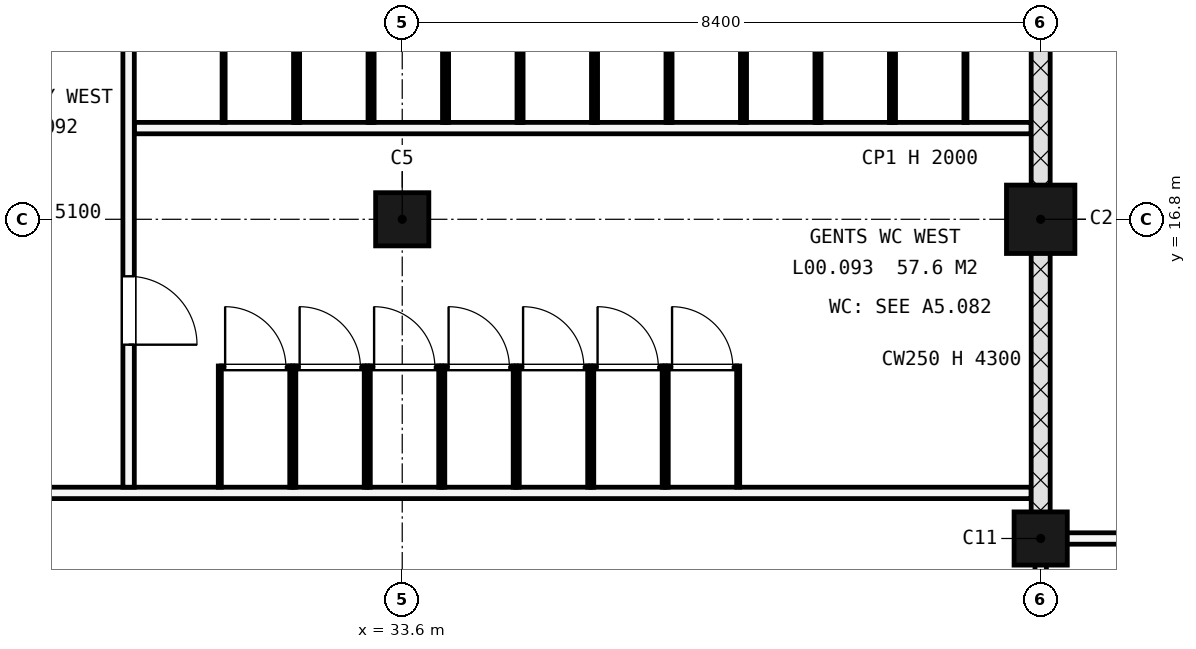
"""IFC4 building model, lengths in metres.
Left out: names, types, materials, properties, quantities, classifications, styles, units other than length and angle.
Written with IfcOpenShell. Run it as: python <this file> out.ifc"""

import sys

from ifc_helpers import new_model, si_unit, direction, frame, frame_2d, origin, origin_2d, place, context, subcontext, project, spatial, rectangle, circle, extrude, element, fill, save


model = new_model("IFC4")
c1 = context("Model", 3, precision=1e-05, world=origin(), true_north=direction((0.0, 1.0)))
c2 = subcontext(c1, "Body", "Model", "MODEL_VIEW")
j1 = project(units=[si_unit("LENGTHUNIT", "METRE"), si_unit("PLANEANGLEUNIT", "RADIAN")], contexts=[c1])
p1 = place(None, origin())
s1 = spatial("IfcSite", under=j1, at=p1, CompositionType="ELEMENT")
p2 = place(p1, origin())
s2 = spatial("IfcBuilding", under=s1, at=p2, CompositionType="ELEMENT")
p3 = place(p2, origin())
s3 = spatial("IfcBuildingStorey", under=s2, at=p3, CompositionType="ELEMENT", Elevation=0.0)
p4 = place(p3, frame((33.6, 16.8, -0.3), z_axis=(0.0, 0.0, 1.0), x_axis=(1.0, 0.0, 0.0)))
e1 = element("IfcColumn", 1, at=p4, inside=s3, PredefinedType="COLUMN", context=c2, shape_type="SweptSolid", body=[
    extrude(rectangle(XDim=0.7, YDim=0.7, at=origin_2d()), origin(), (0.0, 0.0, 1.0), 5.4),
])
p5 = place(p3, frame((42.0, 16.8, -0.3), z_axis=(0.0, 0.0, 1.0), x_axis=(1.0, 0.0, 0.0)))
e2 = element("IfcColumn", 2, at=p5, inside=s3, PredefinedType="COLUMN", context=c2, shape_type="SweptSolid", body=[
    extrude(rectangle(XDim=0.9, YDim=0.9, at=origin_2d()), origin(), (0.0, 0.0, 1.0), 5.4),
])
p6 = place(p3, frame((42.0, 12.6, -0.3), z_axis=(0.0, 0.0, 1.0), x_axis=(1.0, 0.0, 0.0)))
e3 = element("IfcColumn", 3, at=p6, inside=s3, PredefinedType="COLUMN", context=c2, shape_type="SweptSolid", body=[
    extrude(circle(Radius=0.35, at=origin_2d()), origin(), (0.0, 0.0, 1.0), 5.4),
])
p7 = place(p3, frame((41.875, 12.6, 0.0), z_axis=(0.0, 0.0, 1.0), x_axis=(1.0, 0.0, 0.0)))
e4 = element("IfcWall", 4, at=p7, inside=s3, PredefinedType="PARTITIONING", context=c2, shape_type="SweptSolid", body=[
    extrude(rectangle(XDim=42.025, YDim=0.15, at=frame_2d((21.012, 0.0))), origin(), (0.0, 0.0, 1.0), 4.2),
])
p8 = place(p7, frame((19.925, 0.0, 0.0)))
e5 = element("IfcOpeningElement", 5, at=p8, cuts=e4, PredefinedType="OPENING", context=c2, shape_type="SweptSolid", body=[
    extrude(rectangle(XDim=2.4, YDim=2.1, at=frame_2d((1.2, 1.05))), frame((0.0, 0.085, 0.0), z_axis=(0.0, -1.0, 0.0), x_axis=(1.0, 0.0, 0.0)), (0.0, 0.0, 1.0), 0.17),
])
p9 = place(p3, frame((27.675, 13.2, 0.0), z_axis=(0.0, 0.0, 1.0), x_axis=(1.0, 0.0, 0.0)))
e6 = element("IfcWall", 6, at=p9, inside=s3, PredefinedType="PARTITIONING", context=c2, shape_type="SweptSolid", body=[
    extrude(rectangle(XDim=14.2, YDim=0.15, at=frame_2d((7.1, 0.0))), origin(), (0.0, 0.0, 1.0), 5.1),
])
p10 = place(p3, frame((30.075, 18.0, 0.0), z_axis=(0.0, 0.0, 1.0), x_axis=(1.0, 0.0, 0.0)))
e7 = element("IfcWall", 7, at=p10, inside=s3, PredefinedType="PARTITIONING", context=c2, shape_type="SweptSolid", body=[
    extrude(rectangle(XDim=11.8, YDim=0.15, at=frame_2d((5.9, 0.0))), origin(), (0.0, 0.0, 1.0), 5.1),
])
p11 = place(p3, frame((30.0, 13.275, 0.0), z_axis=(0.0, 0.0, 1.0), x_axis=(0.0, 1.0, 0.0)))
e8 = element("IfcWall", 8, at=p11, inside=s3, PredefinedType="PARTITIONING", context=c2, shape_type="SweptSolid", body=[
    extrude(rectangle(XDim=11.825, YDim=0.15, at=frame_2d((5.913, 0.0))), origin(), (0.0, 0.0, 1.0), 5.1),
])
p12 = place(p11, frame((1.875, 0.0, 0.0)))
e9 = element("IfcOpeningElement", 9, at=p12, cuts=e8, PredefinedType="OPENING", context=c2, shape_type="SweptSolid", body=[
    extrude(rectangle(XDim=0.9, YDim=2.1, at=frame_2d((0.45, 1.05))), frame((0.0, 0.085, 0.0), z_axis=(0.0, -1.0, 0.0), x_axis=(1.0, 0.0, 0.0)), (0.0, 0.0, 1.0), 0.17),
])
p13 = place(p11, frame((6.575, 0.0, 0.0)))
e10 = element("IfcOpeningElement", 10, at=p13, cuts=e8, PredefinedType="OPENING", context=c2, shape_type="SweptSolid", body=[
    extrude(rectangle(XDim=0.9, YDim=2.1, at=frame_2d((0.45, 1.05))), frame((0.0, 0.085, 0.0), z_axis=(0.0, -1.0, 0.0), x_axis=(1.0, 0.0, 0.0)), (0.0, 0.0, 1.0), 0.17),
])
p14 = place(p11, frame((10.1, 0.0, 0.0)))
e11 = element("IfcOpeningElement", 11, at=p14, cuts=e8, PredefinedType="OPENING", context=c2, shape_type="SweptSolid", body=[
    extrude(rectangle(XDim=1.05, YDim=2.25, at=frame_2d((0.525, 1.125))), frame((0.0, 0.085, 0.0), z_axis=(0.0, -1.0, 0.0), x_axis=(1.0, 0.0, 0.0)), (0.0, 0.0, 1.0), 0.17),
])
p15 = place(p3, frame((42.0, 8.65, 0.0), z_axis=(0.0, 0.0, 1.0), x_axis=(0.0, 1.0, 0.0)))
e12 = element("IfcWall", 12, at=p15, inside=s3, PredefinedType="PARTITIONING", context=c2, shape_type="SweptSolid", body=[
    extrude(rectangle(XDim=3.875, YDim=0.15, at=frame_2d((1.938, 0.0))), origin(), (0.0, 0.0, 1.0), 4.3),
])
p16 = place(p3, frame((42.0, 12.675, 0.0), z_axis=(0.0, 0.0, 1.0), x_axis=(0.0, 1.0, 0.0)))
e13 = element("IfcWall", 13, at=p16, inside=s3, PredefinedType="SOLIDWALL", context=c2, shape_type="SweptSolid", body=[
    extrude(rectangle(XDim=4.555, YDim=0.25, at=frame_2d((2.277, 0.0))), origin(), (0.0, 0.0, 1.0), 4.3),
])
p17 = place(p3, frame((42.0, 17.23, 0.0), z_axis=(0.0, 0.0, 1.0), x_axis=(0.0, 1.0, 0.0)))
e14 = element("IfcWall", 14, at=p17, inside=s3, PredefinedType="SOLIDWALL", context=c2, shape_type="SweptSolid", body=[
    extrude(rectangle(XDim=7.87, YDim=0.25, at=frame_2d((3.935, 0.0))), origin(), (0.0, 0.0, 1.0), 4.45),
])
p18 = place(p17, frame((6.17, 0.0, 0.0)))
e15 = element("IfcOpeningElement", 15, at=p18, cuts=e14, PredefinedType="OPENING", context=c2, shape_type="SweptSolid", body=[
    extrude(rectangle(XDim=1.0, YDim=2.1, at=frame_2d((0.5, 1.05))), frame((0.0, 0.135, 0.0), z_axis=(0.0, -1.0, 0.0), x_axis=(1.0, 0.0, 0.0)), (0.0, 0.0, 1.0), 0.27),
])
for number, where, z_axis, x_axis in (
    (16, (31.2, 13.275, 0.0), (0.0, 0.0, 1.0), (0.0, 1.0, 0.0)),
    (17, (32.14, 13.275, 0.0), (0.0, 0.0, 1.0), (0.0, 1.0, 0.0)),
):
    element("IfcWall", number, at=place(p3, frame(where, z_axis=z_axis, x_axis=x_axis)), inside=s3, PredefinedType="PARTITIONING", context=c2, shape_type="SweptSolid", body=[
        extrude(rectangle(XDim=1.595, YDim=0.04, at=frame_2d((0.798, 0.0))), origin(), (0.0, 0.0, 1.0), 2.0),
    ])
p19 = place(p3, frame((31.22, 14.85, 0.0), z_axis=(0.0, 0.0, 1.0), x_axis=(1.0, 0.0, 0.0)))
e18 = element("IfcWall", 18, at=p19, inside=s3, PredefinedType="PARTITIONING", context=c2, shape_type="SweptSolid", body=[
    extrude(rectangle(XDim=0.9, YDim=0.04, at=frame_2d((0.45, 0.0))), origin(), (0.0, 0.0, 1.0), 2.0),
])
p20 = place(p19, frame((0.05, 0.0, 0.0)))
e19 = element("IfcOpeningElement", 19, at=p20, cuts=e18, PredefinedType="OPENING", context=c2, shape_type="SweptSolid", body=[
    extrude(rectangle(XDim=0.8, YDim=2.0, at=frame_2d((0.4, 1.0))), frame((0.0, 0.03, 0.0), z_axis=(0.0, -1.0, 0.0), x_axis=(1.0, 0.0, 0.0)), (0.0, 0.0, 1.0), 0.06),
])
for number, where, z_axis, x_axis in (
    (20, (32.18, 13.275, 0.0), (0.0, 0.0, 1.0), (0.0, 1.0, 0.0)),
    (21, (33.12, 13.275, 0.0), (0.0, 0.0, 1.0), (0.0, 1.0, 0.0)),
):
    element("IfcWall", number, at=place(p3, frame(where, z_axis=z_axis, x_axis=x_axis)), inside=s3, PredefinedType="PARTITIONING", context=c2, shape_type="SweptSolid", body=[
        extrude(rectangle(XDim=1.595, YDim=0.04, at=frame_2d((0.798, 0.0))), origin(), (0.0, 0.0, 1.0), 2.0),
    ])
p21 = place(p3, frame((32.2, 14.85, 0.0), z_axis=(0.0, 0.0, 1.0), x_axis=(1.0, 0.0, 0.0)))
e22 = element("IfcWall", 22, at=p21, inside=s3, PredefinedType="PARTITIONING", context=c2, shape_type="SweptSolid", body=[
    extrude(rectangle(XDim=0.9, YDim=0.04, at=frame_2d((0.45, 0.0))), origin(), (0.0, 0.0, 1.0), 2.0),
])
p22 = place(p21, frame((0.05, 0.0, 0.0)))
e23 = element("IfcOpeningElement", 23, at=p22, cuts=e22, PredefinedType="OPENING", context=c2, shape_type="SweptSolid", body=[
    extrude(rectangle(XDim=0.8, YDim=2.0, at=frame_2d((0.4, 1.0))), frame((0.0, 0.03, 0.0), z_axis=(0.0, -1.0, 0.0), x_axis=(1.0, 0.0, 0.0)), (0.0, 0.0, 1.0), 0.06),
])
for number, where, z_axis, x_axis in (
    (24, (33.16, 13.275, 0.0), (0.0, 0.0, 1.0), (0.0, 1.0, 0.0)),
    (25, (34.1, 13.275, 0.0), (0.0, 0.0, 1.0), (0.0, 1.0, 0.0)),
):
    element("IfcWall", number, at=place(p3, frame(where, z_axis=z_axis, x_axis=x_axis)), inside=s3, PredefinedType="PARTITIONING", context=c2, shape_type="SweptSolid", body=[
        extrude(rectangle(XDim=1.595, YDim=0.04, at=frame_2d((0.798, 0.0))), origin(), (0.0, 0.0, 1.0), 2.0),
    ])
p23 = place(p3, frame((33.18, 14.85, 0.0), z_axis=(0.0, 0.0, 1.0), x_axis=(1.0, 0.0, 0.0)))
e26 = element("IfcWall", 26, at=p23, inside=s3, PredefinedType="PARTITIONING", context=c2, shape_type="SweptSolid", body=[
    extrude(rectangle(XDim=0.9, YDim=0.04, at=frame_2d((0.45, 0.0))), origin(), (0.0, 0.0, 1.0), 2.0),
])
p24 = place(p23, frame((0.05, 0.0, 0.0)))
e27 = element("IfcOpeningElement", 27, at=p24, cuts=e26, PredefinedType="OPENING", context=c2, shape_type="SweptSolid", body=[
    extrude(rectangle(XDim=0.8, YDim=2.0, at=frame_2d((0.4, 1.0))), frame((0.0, 0.03, 0.0), z_axis=(0.0, -1.0, 0.0), x_axis=(1.0, 0.0, 0.0)), (0.0, 0.0, 1.0), 0.06),
])
for number, where, z_axis, x_axis in (
    (28, (34.14, 13.275, 0.0), (0.0, 0.0, 1.0), (0.0, 1.0, 0.0)),
    (29, (35.08, 13.275, 0.0), (0.0, 0.0, 1.0), (0.0, 1.0, 0.0)),
):
    element("IfcWall", number, at=place(p3, frame(where, z_axis=z_axis, x_axis=x_axis)), inside=s3, PredefinedType="PARTITIONING", context=c2, shape_type="SweptSolid", body=[
        extrude(rectangle(XDim=1.595, YDim=0.04, at=frame_2d((0.798, 0.0))), origin(), (0.0, 0.0, 1.0), 2.0),
    ])
p25 = place(p3, frame((34.16, 14.85, 0.0), z_axis=(0.0, 0.0, 1.0), x_axis=(1.0, 0.0, 0.0)))
e30 = element("IfcWall", 30, at=p25, inside=s3, PredefinedType="PARTITIONING", context=c2, shape_type="SweptSolid", body=[
    extrude(rectangle(XDim=0.9, YDim=0.04, at=frame_2d((0.45, 0.0))), origin(), (0.0, 0.0, 1.0), 2.0),
])
p26 = place(p25, frame((0.05, 0.0, 0.0)))
e31 = element("IfcOpeningElement", 31, at=p26, cuts=e30, PredefinedType="OPENING", context=c2, shape_type="SweptSolid", body=[
    extrude(rectangle(XDim=0.8, YDim=2.0, at=frame_2d((0.4, 1.0))), frame((0.0, 0.03, 0.0), z_axis=(0.0, -1.0, 0.0), x_axis=(1.0, 0.0, 0.0)), (0.0, 0.0, 1.0), 0.06),
])
for number, where, z_axis, x_axis in (
    (32, (35.12, 13.275, 0.0), (0.0, 0.0, 1.0), (0.0, 1.0, 0.0)),
    (33, (36.06, 13.275, 0.0), (0.0, 0.0, 1.0), (0.0, 1.0, 0.0)),
):
    element("IfcWall", number, at=place(p3, frame(where, z_axis=z_axis, x_axis=x_axis)), inside=s3, PredefinedType="PARTITIONING", context=c2, shape_type="SweptSolid", body=[
        extrude(rectangle(XDim=1.595, YDim=0.04, at=frame_2d((0.798, 0.0))), origin(), (0.0, 0.0, 1.0), 2.0),
    ])
p27 = place(p3, frame((35.14, 14.85, 0.0), z_axis=(0.0, 0.0, 1.0), x_axis=(1.0, 0.0, 0.0)))
e34 = element("IfcWall", 34, at=p27, inside=s3, PredefinedType="PARTITIONING", context=c2, shape_type="SweptSolid", body=[
    extrude(rectangle(XDim=0.9, YDim=0.04, at=frame_2d((0.45, 0.0))), origin(), (0.0, 0.0, 1.0), 2.0),
])
p28 = place(p27, frame((0.05, 0.0, 0.0)))
e35 = element("IfcOpeningElement", 35, at=p28, cuts=e34, PredefinedType="OPENING", context=c2, shape_type="SweptSolid", body=[
    extrude(rectangle(XDim=0.8, YDim=2.0, at=frame_2d((0.4, 1.0))), frame((0.0, 0.03, 0.0), z_axis=(0.0, -1.0, 0.0), x_axis=(1.0, 0.0, 0.0)), (0.0, 0.0, 1.0), 0.06),
])
for number, where, z_axis, x_axis in (
    (36, (36.1, 13.275, 0.0), (0.0, 0.0, 1.0), (0.0, 1.0, 0.0)),
    (37, (37.04, 13.275, 0.0), (0.0, 0.0, 1.0), (0.0, 1.0, 0.0)),
):
    element("IfcWall", number, at=place(p3, frame(where, z_axis=z_axis, x_axis=x_axis)), inside=s3, PredefinedType="PARTITIONING", context=c2, shape_type="SweptSolid", body=[
        extrude(rectangle(XDim=1.595, YDim=0.04, at=frame_2d((0.798, 0.0))), origin(), (0.0, 0.0, 1.0), 2.0),
    ])
p29 = place(p3, frame((36.12, 14.85, 0.0), z_axis=(0.0, 0.0, 1.0), x_axis=(1.0, 0.0, 0.0)))
e38 = element("IfcWall", 38, at=p29, inside=s3, PredefinedType="PARTITIONING", context=c2, shape_type="SweptSolid", body=[
    extrude(rectangle(XDim=0.9, YDim=0.04, at=frame_2d((0.45, 0.0))), origin(), (0.0, 0.0, 1.0), 2.0),
])
p30 = place(p29, frame((0.05, 0.0, 0.0)))
e39 = element("IfcOpeningElement", 39, at=p30, cuts=e38, PredefinedType="OPENING", context=c2, shape_type="SweptSolid", body=[
    extrude(rectangle(XDim=0.8, YDim=2.0, at=frame_2d((0.4, 1.0))), frame((0.0, 0.03, 0.0), z_axis=(0.0, -1.0, 0.0), x_axis=(1.0, 0.0, 0.0)), (0.0, 0.0, 1.0), 0.06),
])
for number, where, z_axis, x_axis in (
    (40, (37.08, 13.275, 0.0), (0.0, 0.0, 1.0), (0.0, 1.0, 0.0)),
    (41, (38.02, 13.275, 0.0), (0.0, 0.0, 1.0), (0.0, 1.0, 0.0)),
):
    element("IfcWall", number, at=place(p3, frame(where, z_axis=z_axis, x_axis=x_axis)), inside=s3, PredefinedType="PARTITIONING", context=c2, shape_type="SweptSolid", body=[
        extrude(rectangle(XDim=1.595, YDim=0.04, at=frame_2d((0.798, 0.0))), origin(), (0.0, 0.0, 1.0), 2.0),
    ])
p31 = place(p3, frame((37.1, 14.85, 0.0), z_axis=(0.0, 0.0, 1.0), x_axis=(1.0, 0.0, 0.0)))
e42 = element("IfcWall", 42, at=p31, inside=s3, PredefinedType="PARTITIONING", context=c2, shape_type="SweptSolid", body=[
    extrude(rectangle(XDim=0.9, YDim=0.04, at=frame_2d((0.45, 0.0))), origin(), (0.0, 0.0, 1.0), 2.0),
])
p32 = place(p31, frame((0.05, 0.0, 0.0)))
e43 = element("IfcOpeningElement", 43, at=p32, cuts=e42, PredefinedType="OPENING", context=c2, shape_type="SweptSolid", body=[
    extrude(rectangle(XDim=0.8, YDim=2.0, at=frame_2d((0.4, 1.0))), frame((0.0, 0.03, 0.0), z_axis=(0.0, -1.0, 0.0), x_axis=(1.0, 0.0, 0.0)), (0.0, 0.0, 1.0), 0.06),
])
for number, where, z_axis, x_axis in (
    (44, (31.25, 18.075, 0.0), (0.0, 0.0, 1.0), (0.0, 1.0, 0.0)),
    (45, (32.19, 18.075, 0.0), (0.0, 0.0, 1.0), (0.0, 1.0, 0.0)),
    (46, (32.23, 18.075, 0.0), (0.0, 0.0, 1.0), (0.0, 1.0, 0.0)),
    (47, (33.17, 18.075, 0.0), (0.0, 0.0, 1.0), (0.0, 1.0, 0.0)),
    (48, (33.21, 18.075, 0.0), (0.0, 0.0, 1.0), (0.0, 1.0, 0.0)),
    (49, (34.15, 18.075, 0.0), (0.0, 0.0, 1.0), (0.0, 1.0, 0.0)),
    (50, (34.19, 18.075, 0.0), (0.0, 0.0, 1.0), (0.0, 1.0, 0.0)),
    (51, (35.13, 18.075, 0.0), (0.0, 0.0, 1.0), (0.0, 1.0, 0.0)),
    (52, (35.17, 18.075, 0.0), (0.0, 0.0, 1.0), (0.0, 1.0, 0.0)),
    (53, (36.11, 18.075, 0.0), (0.0, 0.0, 1.0), (0.0, 1.0, 0.0)),
    (54, (36.15, 18.075, 0.0), (0.0, 0.0, 1.0), (0.0, 1.0, 0.0)),
    (55, (37.09, 18.075, 0.0), (0.0, 0.0, 1.0), (0.0, 1.0, 0.0)),
    (56, (37.13, 18.075, 0.0), (0.0, 0.0, 1.0), (0.0, 1.0, 0.0)),
    (57, (38.07, 18.075, 0.0), (0.0, 0.0, 1.0), (0.0, 1.0, 0.0)),
    (58, (38.11, 18.075, 0.0), (0.0, 0.0, 1.0), (0.0, 1.0, 0.0)),
    (59, (39.05, 18.075, 0.0), (0.0, 0.0, 1.0), (0.0, 1.0, 0.0)),
    (60, (39.09, 18.075, 0.0), (0.0, 0.0, 1.0), (0.0, 1.0, 0.0)),
    (61, (40.03, 18.075, 0.0), (0.0, 0.0, 1.0), (0.0, 1.0, 0.0)),
    (62, (40.07, 18.075, 0.0), (0.0, 0.0, 1.0), (0.0, 1.0, 0.0)),
    (63, (41.01, 18.075, 0.0), (0.0, 0.0, 1.0), (0.0, 1.0, 0.0)),
):
    element("IfcWall", number, at=place(p3, frame(where, z_axis=z_axis, x_axis=x_axis)), inside=s3, PredefinedType="PARTITIONING", context=c2, shape_type="SweptSolid", body=[
        extrude(rectangle(XDim=1.595, YDim=0.04, at=frame_2d((0.797, 0.0))), origin(), (0.0, 0.0, 1.0), 2.0),
    ])
p33 = place(p12, origin())
e64 = element("IfcDoor", 64, at=p33, inside=s3, OperationType="SINGLE_SWING_LEFT", PredefinedType="DOOR", context=c2, shape_type="SweptSolid", body=[
    extrude(rectangle(XDim=0.9, YDim=2.1, at=frame_2d((0.45, 1.05))), frame((0.0, 0.025, 0.0), z_axis=(0.0, -1.0, 0.0), x_axis=(1.0, 0.0, 0.0)), (0.0, 0.0, 1.0), 0.05),
])
fill(e9, e64)
p34 = place(p20, origin())
e65 = element("IfcDoor", 65, at=p34, inside=s3, OperationType="SINGLE_SWING_LEFT", PredefinedType="DOOR", context=c2, shape_type="SweptSolid", body=[
    extrude(rectangle(XDim=0.8, YDim=2.0, at=frame_2d((0.4, 1.0))), frame((0.0, 0.02, 0.0), z_axis=(0.0, -1.0, 0.0), x_axis=(1.0, 0.0, 0.0)), (0.0, 0.0, 1.0), 0.04),
])
fill(e19, e65)
p35 = place(p22, origin())
e66 = element("IfcDoor", 66, at=p35, inside=s3, OperationType="SINGLE_SWING_LEFT", PredefinedType="DOOR", context=c2, shape_type="SweptSolid", body=[
    extrude(rectangle(XDim=0.8, YDim=2.0, at=frame_2d((0.4, 1.0))), frame((0.0, 0.02, 0.0), z_axis=(0.0, -1.0, 0.0), x_axis=(1.0, 0.0, 0.0)), (0.0, 0.0, 1.0), 0.04),
])
fill(e23, e66)
p36 = place(p24, origin())
e67 = element("IfcDoor", 67, at=p36, inside=s3, OperationType="SINGLE_SWING_LEFT", PredefinedType="DOOR", context=c2, shape_type="SweptSolid", body=[
    extrude(rectangle(XDim=0.8, YDim=2.0, at=frame_2d((0.4, 1.0))), frame((0.0, 0.02, 0.0), z_axis=(0.0, -1.0, 0.0), x_axis=(1.0, 0.0, 0.0)), (0.0, 0.0, 1.0), 0.04),
])
fill(e27, e67)
p37 = place(p26, origin())
e68 = element("IfcDoor", 68, at=p37, inside=s3, OperationType="SINGLE_SWING_LEFT", PredefinedType="DOOR", context=c2, shape_type="SweptSolid", body=[
    extrude(rectangle(XDim=0.8, YDim=2.0, at=frame_2d((0.4, 1.0))), frame((0.0, 0.02, 0.0), z_axis=(0.0, -1.0, 0.0), x_axis=(1.0, 0.0, 0.0)), (0.0, 0.0, 1.0), 0.04),
])
fill(e31, e68)
p38 = place(p28, origin())
e69 = element("IfcDoor", 69, at=p38, inside=s3, OperationType="SINGLE_SWING_LEFT", PredefinedType="DOOR", context=c2, shape_type="SweptSolid", body=[
    extrude(rectangle(XDim=0.8, YDim=2.0, at=frame_2d((0.4, 1.0))), frame((0.0, 0.02, 0.0), z_axis=(0.0, -1.0, 0.0), x_axis=(1.0, 0.0, 0.0)), (0.0, 0.0, 1.0), 0.04),
])
fill(e35, e69)
p39 = place(p30, origin())
e70 = element("IfcDoor", 70, at=p39, inside=s3, OperationType="SINGLE_SWING_LEFT", PredefinedType="DOOR", context=c2, shape_type="SweptSolid", body=[
    extrude(rectangle(XDim=0.8, YDim=2.0, at=frame_2d((0.4, 1.0))), frame((0.0, 0.02, 0.0), z_axis=(0.0, -1.0, 0.0), x_axis=(1.0, 0.0, 0.0)), (0.0, 0.0, 1.0), 0.04),
])
fill(e39, e70)
p40 = place(p32, origin())
e71 = element("IfcDoor", 71, at=p40, inside=s3, OperationType="SINGLE_SWING_LEFT", PredefinedType="DOOR", context=c2, shape_type="SweptSolid", body=[
    extrude(rectangle(XDim=0.8, YDim=2.0, at=frame_2d((0.4, 1.0))), frame((0.0, 0.02, 0.0), z_axis=(0.0, -1.0, 0.0), x_axis=(1.0, 0.0, 0.0)), (0.0, 0.0, 1.0), 0.04),
])
fill(e43, e71)
save(model, sys.argv[1])
